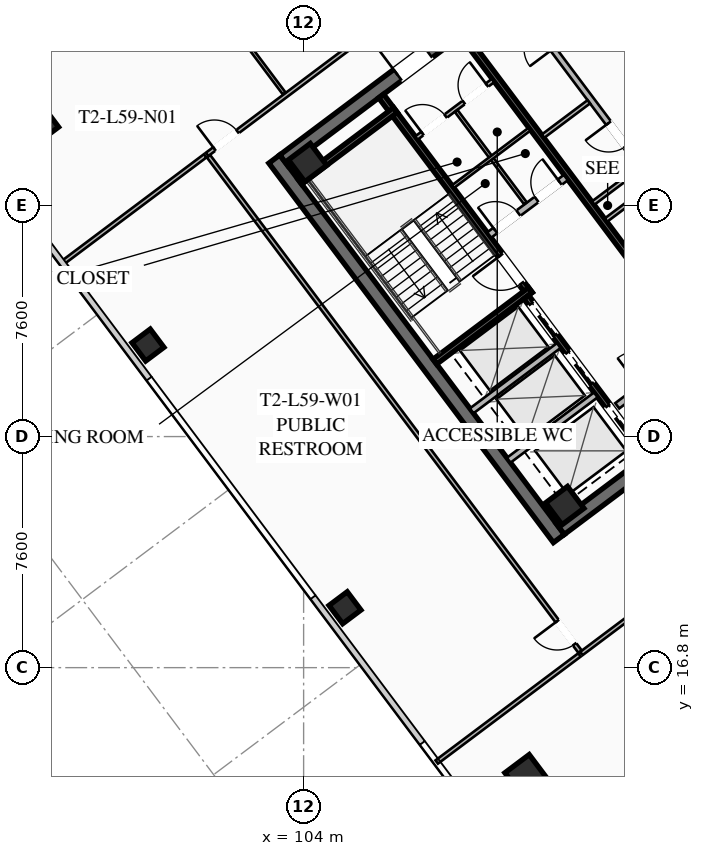
"""IFC4 building model, lengths in metres.
Left out: names, types, materials, properties, quantities, classifications, styles, units other than length and angle.
Written with IfcOpenShell. Run it as: python <this file> out.ifc"""

import sys

from ifc_helpers import new_model, si_unit, direction, frame, frame_2d, origin, origin_2d, place, context, subcontext, project, spatial, rectangle, hollow_rectangle, extrude, element, fill, save


model = new_model("IFC4")
c1 = context("Model", 3, precision=1e-05, world=origin(), true_north=direction((0.0, 1.0)))
c2 = subcontext(c1, "Body", "Model", "MODEL_VIEW")
j1 = project(units=[si_unit("LENGTHUNIT", "METRE"), si_unit("PLANEANGLEUNIT", "RADIAN")], contexts=[c1])
p1 = place(None, origin())
s1 = spatial("IfcSite", under=j1, at=p1, CompositionType="ELEMENT")
p2 = place(p1, origin())
s2 = spatial("IfcBuilding", under=s1, at=p2, CompositionType="ELEMENT")
p3 = place(p2, frame((0.0, 0.0, 218.4)))
s3 = spatial("IfcBuildingStorey", under=s2, at=p3, CompositionType="ELEMENT", Elevation=218.4)
p4 = place(p3, frame((112.396, 21.047, 0.0), z_axis=(0.0, 0.0, 1.0), x_axis=(-0.600005007985, 0.799996243986, 0.0)))
e1 = element("IfcWall", 1, at=p4, inside=s3, PredefinedType="SHEAR", context=c2, shape_type="SweptSolid", body=[
    extrude(rectangle(XDim=15.6, YDim=0.45, at=frame_2d((7.8, 0.0))), origin(), (0.0, 0.0, 1.0), 3.55),
])
p5 = place(p3, frame((124.649, 30.518, 0.0), z_axis=(0.0, 0.0, 1.0), x_axis=(-0.8, -0.6, 0.0)))
e2 = element("IfcWall", 2, at=p5, inside=s3, PredefinedType="SHEAR", context=c2, shape_type="SweptSolid", body=[
    extrude(rectangle(XDim=15.26, YDim=0.45, at=frame_2d((7.63, 0.0))), origin(), (0.0, 0.0, 1.0), 3.55),
])
p6 = place(p5, frame((9.33, 0.0, 0.0)))
e3 = element("IfcOpeningElement", 3, at=p6, cuts=e2, PredefinedType="OPENING", context=c2, shape_type="SweptSolid", body=[
    extrude(rectangle(XDim=1.25, YDim=2.25, at=frame_2d((0.625, 1.125))), frame((0.0, 0.235, 0.0), z_axis=(0.0, -1.0, 0.0), x_axis=(1.0, 0.0, 0.0)), (0.0, 0.0, 1.0), 0.47),
])
p7 = place(p5, frame((4.28, 0.0, 0.0)))
e4 = element("IfcOpeningElement", 4, at=p7, cuts=e2, PredefinedType="OPENING", context=c2, shape_type="SweptSolid", body=[
    extrude(rectangle(XDim=1.25, YDim=2.25, at=frame_2d((0.625, 1.125))), frame((0.0, 0.235, 0.0), z_axis=(0.0, -1.0, 0.0), x_axis=(1.0, 0.0, 0.0)), (0.0, 0.0, 1.0), 0.47),
])
p8 = place(p3, frame((103.351, 33.482, 0.0), z_axis=(0.0, 0.0, 1.0), x_axis=(0.8, 0.6, 0.0)))
e5 = element("IfcWall", 5, at=p8, inside=s3, PredefinedType="SHEAR", context=c2, shape_type="SweptSolid", body=[
    extrude(rectangle(XDim=15.26, YDim=0.45, at=frame_2d((7.63, 0.0))), origin(), (0.0, 0.0, 1.0), 3.55),
])
p9 = place(p8, frame((4.68, 0.0, 0.0)))
e6 = element("IfcOpeningElement", 6, at=p9, cuts=e5, PredefinedType="OPENING", context=c2, shape_type="SweptSolid", body=[
    extrude(rectangle(XDim=1.25, YDim=2.25, at=frame_2d((0.625, 1.125))), frame((0.0, 0.235, 0.0), z_axis=(0.0, -1.0, 0.0), x_axis=(1.0, 0.0, 0.0)), (0.0, 0.0, 1.0), 0.47),
])
p10 = place(p8, frame((9.73, 0.0, 0.0)))
e7 = element("IfcOpeningElement", 7, at=p10, cuts=e5, PredefinedType="OPENING", context=c2, shape_type="SweptSolid", body=[
    extrude(rectangle(XDim=1.25, YDim=2.25, at=frame_2d((0.625, 1.125))), frame((0.0, 0.235, 0.0), z_axis=(0.0, -1.0, 0.0), x_axis=(1.0, 0.0, 0.0)), (0.0, 0.0, 1.0), 0.47),
])
for number, where, z_axis, x_axis in (
    (8, (112.59, 22.13, 0.0), (0.0, 0.0, 1.0), (0.8, 0.6, 0.0)),
    (9, (104.13, 33.41, 0.0), (0.0, 0.0, 1.0), (0.8, 0.6, 0.0)),
):
    element("IfcColumn", number, at=place(p3, frame(where, z_axis=z_axis, x_axis=x_axis)), inside=s3, PredefinedType="COLUMN", context=c2, shape_type="SweptSolid", body=[
        extrude(hollow_rectangle(XDim=0.9, YDim=0.9, WallThickness=0.04, at=origin_2d()), origin(), (0.0, 0.0, 1.0), 3.37),
    ])
for number, where, z_axis, x_axis in (
    (10, (111.32, 13.24, 0.0), (0.0, 0.0, 1.0), (0.8, 0.6, 0.0)),
    (11, (95.24, 34.68, 0.0), (0.0, 0.0, 1.0), (0.8, 0.6, 0.0)),
):
    element("IfcColumn", number, at=place(p3, frame(where, z_axis=z_axis, x_axis=x_axis)), inside=s3, PredefinedType="COLUMN", context=c2, shape_type="SweptSolid", body=[
        extrude(hollow_rectangle(XDim=1.0, YDim=1.0, WallThickness=0.04, at=origin_2d()), origin(), (0.0, 0.0, 1.0), 3.37),
    ])
for number, where, z_axis, x_axis in (
    (12, (98.88, 27.41, 0.0), (0.0, 0.0, 1.0), (0.8, 0.6, 0.0)),
    (13, (105.36, 18.77, 0.0), (0.0, 0.0, 1.0), (0.8, 0.6, 0.0)),
):
    element("IfcColumn", number, at=place(p3, frame(where, z_axis=z_axis, x_axis=x_axis)), inside=s3, PredefinedType="COLUMN", context=c2, shape_type="SweptSolid", body=[
        extrude(hollow_rectangle(XDim=0.75, YDim=0.75, WallThickness=0.032, at=origin_2d()), origin(), (0.0, 0.0, 1.0), 3.37),
    ])
p11 = place(p3, frame((111.44, 29.08, 0.0), z_axis=(0.0, 0.0, 1.0), x_axis=(-0.59999041401, 0.800007189403, 0.0)))
e14 = element("IfcWall", 14, at=p11, inside=s3, PredefinedType="SHEAR", context=c2, shape_type="SweptSolid", body=[
    extrude(rectangle(XDim=8.15, YDim=0.2, at=frame_2d((4.075, 0.0))), origin(), (0.0, 0.0, 1.0), 3.37),
])
p12 = place(p11, frame((0.45, 0.0, 0.0)))
e15 = element("IfcOpeningElement", 15, at=p12, cuts=e14, PredefinedType="OPENING", context=c2, shape_type="SweptSolid", body=[
    extrude(rectangle(XDim=1.15, YDim=2.2, at=frame_2d((0.575, 1.1))), frame((0.0, 0.11, 0.0), z_axis=(0.0, -1.0, 0.0), x_axis=(1.0, 0.0, 0.0)), (0.0, 0.0, 1.0), 0.22),
])
for number, where, z_axis, x_axis in (
    (16, (108.316, 26.862, 0.0), (0.0, 0.0, 1.0), (0.8, 0.6, 0.0)),
    (17, (103.876, 32.782, 0.0), (0.0, 0.0, 1.0), (0.8, 0.6, 0.0)),
):
    element("IfcWall", number, at=place(p3, frame(where, z_axis=z_axis, x_axis=x_axis)), inside=s3, PredefinedType="SHEAR", context=c2, shape_type="SweptSolid", body=[
        extrude(rectangle(XDim=3.93, YDim=0.2, at=frame_2d((1.965, 0.0))), origin(), (0.0, 0.0, 1.0), 3.37),
    ])
p13 = place(p3, frame((118.058, 25.856, 0.0), z_axis=(0.0, 0.0, 1.0), x_axis=(-0.600002657301, 0.799998007018, 0.0)))
e18 = element("IfcWall", 18, at=p13, inside=s3, PredefinedType="SHEAR", context=c2, shape_type="SweptSolid", body=[
    extrude(rectangle(XDim=14.7, YDim=0.2, at=frame_2d((7.35, 0.0))), origin(), (0.0, 0.0, 1.0), 3.37),
])
p14 = place(p3, frame((110.104, 31.028, 0.0), z_axis=(0.0, 0.0, 1.0), x_axis=(0.800018601094, 0.59997519774, 0.0)))
e19 = element("IfcWall", 19, at=p14, inside=s3, PredefinedType="SOLIDWALL", context=c2, shape_type="SweptSolid", body=[
    extrude(rectangle(XDim=3.15, YDim=0.22, at=frame_2d((1.575, 0.0))), origin(), (0.0, 0.0, 1.0), 2.723),
])
p15 = place(p14, frame((0.25, 0.0, 0.0)))
e20 = element("IfcOpeningElement", 20, at=p15, cuts=e19, PredefinedType="OPENING", context=c2, shape_type="SweptSolid", body=[
    extrude(rectangle(XDim=0.95, YDim=2.05, at=frame_2d((0.475, 1.025))), frame((0.0, 0.12, 0.0), z_axis=(0.0, -1.0, 0.0), x_axis=(1.0, 0.0, 0.0)), (0.0, 0.0, 1.0), 0.24),
])
p16 = place(p14, frame((1.95, 0.0, 0.0)))
e21 = element("IfcOpeningElement", 21, at=p16, cuts=e19, PredefinedType="OPENING", context=c2, shape_type="SweptSolid", body=[
    extrude(rectangle(XDim=0.95, YDim=2.05, at=frame_2d((0.475, 1.025))), frame((0.0, 0.12, 0.0), z_axis=(0.0, -1.0, 0.0), x_axis=(1.0, 0.0, 0.0)), (0.0, 0.0, 1.0), 0.24),
])
p17 = place(p3, frame((114.316, 25.412, 0.0), z_axis=(0.0, 0.0, 1.0), x_axis=(0.800018601094, 0.59997519774, 0.0)))
e22 = element("IfcWall", 22, at=p17, inside=s3, PredefinedType="SOLIDWALL", context=c2, shape_type="SweptSolid", body=[
    extrude(rectangle(XDim=3.15, YDim=0.22, at=frame_2d((1.575, 0.0))), origin(), (0.0, 0.0, 1.0), 2.723),
])
p18 = place(p17, frame((0.95, 0.0, 0.0)))
e23 = element("IfcOpeningElement", 23, at=p18, cuts=e22, PredefinedType="OPENING", context=c2, shape_type="SweptSolid", body=[
    extrude(rectangle(XDim=1.25, YDim=2.25, at=frame_2d((0.625, 1.125))), frame((0.0, 0.12, 0.0), z_axis=(0.0, -1.0, 0.0), x_axis=(1.0, 0.0, 0.0)), (0.0, 0.0, 1.0), 0.24),
])
p19 = place(p3, frame((115.25, 23.75, 0.0), z_axis=(0.0, 0.0, 1.0), x_axis=(-0.599994036198, 0.800004472816, 0.0)))
e24 = element("IfcWall", 24, at=p19, inside=s3, PredefinedType="SHEAR", context=c2, shape_type="SweptSolid", body=[
    extrude(rectangle(XDim=6.55, YDim=0.2, at=frame_2d((3.275, 0.0))), origin(), (0.0, 0.0, 1.0), 3.37),
])
p20 = place(p19, frame((4.975, 0.0, 0.0)))
e25 = element("IfcOpeningElement", 25, at=p20, cuts=e24, PredefinedType="OPENING", context=c2, shape_type="SweptSolid", body=[
    extrude(rectangle(XDim=1.3, YDim=2.25, at=frame_2d((0.65, 1.125))), frame((0.0, 0.11, 0.0), z_axis=(0.0, -1.0, 0.0), x_axis=(1.0, 0.0, 0.0)), (0.0, 0.0, 1.0), 0.22),
])
p21 = place(p19, frame((2.975, 0.0, 0.0)))
e26 = element("IfcOpeningElement", 26, at=p21, cuts=e24, PredefinedType="OPENING", context=c2, shape_type="SweptSolid", body=[
    extrude(rectangle(XDim=1.3, YDim=2.25, at=frame_2d((0.65, 1.125))), frame((0.0, 0.11, 0.0), z_axis=(0.0, -1.0, 0.0), x_axis=(1.0, 0.0, 0.0)), (0.0, 0.0, 1.0), 0.22),
])
p22 = place(p19, frame((0.775, 0.0, 0.0)))
e27 = element("IfcOpeningElement", 27, at=p22, cuts=e24, PredefinedType="OPENING", context=c2, shape_type="SweptSolid", body=[
    extrude(rectangle(XDim=1.3, YDim=2.25, at=frame_2d((0.65, 1.125))), frame((0.0, 0.11, 0.0), z_axis=(0.0, -1.0, 0.0), x_axis=(1.0, 0.0, 0.0)), (0.0, 0.0, 1.0), 0.22),
])
for number, where, z_axis, x_axis in (
    (28, (110.746, 23.622, 0.0), (0.0, 0.0, 1.0), (0.8, 0.6, 0.0)),
    (29, (109.528, 25.246, 0.0), (0.0, 0.0, 1.0), (0.8, 0.6, 0.0)),
):
    element("IfcWall", number, at=place(p3, frame(where, z_axis=z_axis, x_axis=x_axis)), inside=s3, PredefinedType="SOLIDWALL", context=c2, shape_type="SweptSolid", body=[
        extrude(rectangle(XDim=3.58, YDim=0.2, at=frame_2d((1.79, 0.0))), origin(), (0.0, 0.0, 1.0), 3.37),
    ])
p23 = place(p3, frame((112.75, 40.25, 0.0), z_axis=(0.0, 0.0, 1.0), x_axis=(0.599994036198, -0.800004472816, 0.0)))
e30 = element("IfcWall", 30, at=p23, inside=s3, PredefinedType="SHEAR", context=c2, shape_type="SweptSolid", body=[
    extrude(rectangle(XDim=6.55, YDim=0.2, at=frame_2d((3.275, 0.0))), origin(), (0.0, 0.0, 1.0), 3.37),
])
p24 = place(p23, frame((5.075, 0.0, 0.0)))
e31 = element("IfcOpeningElement", 31, at=p24, cuts=e30, PredefinedType="OPENING", context=c2, shape_type="SweptSolid", body=[
    extrude(rectangle(XDim=1.1, YDim=2.2, at=frame_2d((0.55, 1.1))), frame((0.0, 0.11, 0.0), z_axis=(0.0, -1.0, 0.0), x_axis=(1.0, 0.0, 0.0)), (0.0, 0.0, 1.0), 0.22),
])
p25 = place(p23, frame((3.025, 0.0, 0.0)))
e32 = element("IfcOpeningElement", 32, at=p25, cuts=e30, PredefinedType="OPENING", context=c2, shape_type="SweptSolid", body=[
    extrude(rectangle(XDim=1.1, YDim=2.2, at=frame_2d((0.55, 1.1))), frame((0.0, 0.11, 0.0), z_axis=(0.0, -1.0, 0.0), x_axis=(1.0, 0.0, 0.0)), (0.0, 0.0, 1.0), 0.22),
])
p26 = place(p23, frame((1.025, 0.0, 0.0)))
e33 = element("IfcOpeningElement", 33, at=p26, cuts=e30, PredefinedType="OPENING", context=c2, shape_type="SweptSolid", body=[
    extrude(rectangle(XDim=1.1, YDim=2.2, at=frame_2d((0.55, 1.1))), frame((0.0, 0.11, 0.0), z_axis=(0.0, -1.0, 0.0), x_axis=(1.0, 0.0, 0.0)), (0.0, 0.0, 1.0), 0.22),
])
p27 = place(p3, frame((107.71, 34.22, 0.0), z_axis=(0.0, 0.0, 1.0), x_axis=(0.799981399002, 0.60002480053, 0.0)))
e34 = element("IfcWall", 34, at=p27, inside=s3, PredefinedType="PARTITIONING", context=c2, shape_type="SweptSolid", body=[
    extrude(rectangle(XDim=3.15, YDim=0.135, at=frame_2d((1.575, 0.0))), origin(), (0.0, 0.0, 1.0), 2.723),
])
p28 = place(p27, frame((0.25, 0.0, 0.0)))
e35 = element("IfcOpeningElement", 35, at=p28, cuts=e34, PredefinedType="OPENING", context=c2, shape_type="SweptSolid", body=[
    extrude(rectangle(XDim=0.95, YDim=2.05, at=frame_2d((0.475, 1.025))), frame((0.0, 0.077, 0.0), z_axis=(0.0, -1.0, 0.0), x_axis=(1.0, 0.0, 0.0)), (0.0, 0.0, 1.0), 0.155),
])
p29 = place(p27, frame((1.95, 0.0, 0.0)))
e36 = element("IfcOpeningElement", 36, at=p29, cuts=e34, PredefinedType="OPENING", context=c2, shape_type="SweptSolid", body=[
    extrude(rectangle(XDim=0.95, YDim=2.05, at=frame_2d((0.475, 1.025))), frame((0.0, 0.077, 0.0), z_axis=(0.0, -1.0, 0.0), x_axis=(1.0, 0.0, 0.0)), (0.0, 0.0, 1.0), 0.155),
])
p30 = place(p3, frame((111.296, 32.072, 0.0), z_axis=(0.0, 0.0, 1.0), x_axis=(-0.59995887973, 0.800030838552, 0.0)))
e37 = element("IfcWall", 37, at=p30, inside=s3, PredefinedType="PARTITIONING", context=c2, shape_type="SweptSolid", body=[
    extrude(rectangle(XDim=3.8, YDim=0.11, at=frame_2d((1.9, 0.0))), origin(), (0.0, 0.0, 1.0), 2.723),
])
p31 = place(p3, frame((108.91, 32.62, 0.0), z_axis=(0.0, 0.0, 1.0), x_axis=(0.800018601094, 0.59997519774, 0.0)))
e38 = element("IfcWall", 38, at=p31, inside=s3, PredefinedType="PARTITIONING", context=c2, shape_type="SweptSolid", body=[
    extrude(rectangle(XDim=3.15, YDim=0.11, at=frame_2d((1.575, 0.0))), origin(), (0.0, 0.0, 1.0), 2.723),
])
p32 = place(p3, frame((113.946, 31.522, 0.0), z_axis=(0.0, 0.0, 1.0), x_axis=(0.8, 0.6, 0.0)))
e39 = element("IfcWall", 39, at=p32, inside=s3, PredefinedType="PARTITIONING", context=c2, shape_type="SweptSolid", body=[
    extrude(rectangle(XDim=1.88, YDim=0.135, at=frame_2d((0.94, 0.0))), origin(), (0.0, 0.0, 1.0), 2.723),
])
p33 = place(p3, frame((115.11, 33.27, 0.0), z_axis=(0.0, 0.0, 1.0), x_axis=(-0.600011160345, 0.79999162962, 0.0)))
e40 = element("IfcWall", 40, at=p33, inside=s3, PredefinedType="SOLIDWALL", context=c2, shape_type="SweptSolid", body=[
    extrude(rectangle(XDim=7.0, YDim=0.2, at=frame_2d((3.5, 0.0))), origin(), (0.0, 0.0, 1.0), 2.723),
])
p34 = place(p33, frame((0.85, 0.0, 0.0)))
e41 = element("IfcOpeningElement", 41, at=p34, cuts=e40, PredefinedType="OPENING", context=c2, shape_type="SweptSolid", body=[
    extrude(rectangle(XDim=0.95, YDim=2.05, at=frame_2d((0.475, 1.025))), frame((0.0, 0.11, 0.0), z_axis=(0.0, -1.0, 0.0), x_axis=(1.0, 0.0, 0.0)), (0.0, 0.0, 1.0), 0.22),
])
p35 = place(p33, frame((4.85, 0.0, 0.0)))
e42 = element("IfcOpeningElement", 42, at=p35, cuts=e40, PredefinedType="OPENING", context=c2, shape_type="SweptSolid", body=[
    extrude(rectangle(XDim=0.95, YDim=2.05, at=frame_2d((0.475, 1.025))), frame((0.0, 0.11, 0.0), z_axis=(0.0, -1.0, 0.0), x_axis=(1.0, 0.0, 0.0)), (0.0, 0.0, 1.0), 0.22),
])
p36 = place(p3, frame((113.526, 32.082, 0.0), z_axis=(0.0, 0.0, 1.0), x_axis=(0.800046745961, 0.599937666993, 0.0)))
e43 = element("IfcWall", 43, at=p36, inside=s3, PredefinedType="PARTITIONING", context=c2, shape_type="SweptSolid", body=[
    extrude(rectangle(XDim=1.88, YDim=0.135, at=frame_2d((0.94, 0.0))), origin(), (0.0, 0.0, 1.0), 2.723),
])
p37 = place(p3, frame((111.876, 34.282, 0.0), z_axis=(0.0, 0.0, 1.0), x_axis=(0.8, 0.6, 0.0)))
e44 = element("IfcWall", 44, at=p37, inside=s3, PredefinedType="PARTITIONING", context=c2, shape_type="SweptSolid", body=[
    extrude(rectangle(XDim=1.88, YDim=0.135, at=frame_2d((0.94, 0.0))), origin(), (0.0, 0.0, 1.0), 2.723),
])
p38 = place(p3, frame((100.826, 33.682, 0.0), z_axis=(0.0, 0.0, 1.0), x_axis=(0.79999742786, 0.600003429504, 0.0)))
e45 = element("IfcWall", 45, at=p38, inside=s3, PredefinedType="PARTITIONING", context=c2, shape_type="SweptSolid", body=[
    extrude(rectangle(XDim=22.78, YDim=0.135, at=frame_2d((11.39, 0.0))), origin(), (0.0, 0.0, 1.0), 2.723),
])
p39 = place(p38, frame((0.3, 0.0, 0.0)))
e46 = element("IfcOpeningElement", 46, at=p39, cuts=e45, PredefinedType="OPENING", context=c2, shape_type="SweptSolid", body=[
    extrude(rectangle(XDim=0.95, YDim=2.05, at=frame_2d((0.475, 1.025))), frame((0.0, 0.077, 0.0), z_axis=(0.0, -1.0, 0.0), x_axis=(1.0, 0.0, 0.0)), (0.0, 0.0, 1.0), 0.155),
])
p40 = place(p38, frame((9.143, 0.0, 0.0)))
e47 = element("IfcOpeningElement", 47, at=p40, cuts=e45, PredefinedType="OPENING", context=c2, shape_type="SweptSolid", body=[
    extrude(rectangle(XDim=0.95, YDim=2.05, at=frame_2d((0.475, 1.025))), frame((0.0, 0.077, 0.0), z_axis=(0.0, -1.0, 0.0), x_axis=(1.0, 0.0, 0.0)), (0.0, 0.0, 1.0), 0.155),
])
p41 = place(p38, frame((21.53, 0.0, 0.0)))
e48 = element("IfcOpeningElement", 48, at=p41, cuts=e45, PredefinedType="OPENING", context=c2, shape_type="SweptSolid", body=[
    extrude(rectangle(XDim=0.95, YDim=2.05, at=frame_2d((0.475, 1.025))), frame((0.0, 0.077, 0.0), z_axis=(0.0, -1.0, 0.0), x_axis=(1.0, 0.0, 0.0)), (0.0, 0.0, 1.0), 0.155),
])
p42 = place(p3, frame((103.362, 35.684, 0.0), z_axis=(0.0, 0.0, 1.0), x_axis=(-0.6, 0.8, 0.0)))
e49 = element("IfcWall", 49, at=p42, inside=s3, PredefinedType="PARTITIONING", context=c2, shape_type="SweptSolid", body=[
    extrude(rectangle(XDim=6.15, YDim=0.11, at=frame_2d((3.075, 0.0))), origin(), (0.0, 0.0, 1.0), 2.723),
])
p43 = place(p3, frame((124.282, 25.624, 0.0), z_axis=(0.0, 0.0, 1.0), x_axis=(-0.800004206286, -0.599994391578, 0.0)))
e50 = element("IfcWall", 50, at=p43, inside=s3, PredefinedType="PARTITIONING", context=c2, shape_type="SweptSolid", body=[
    extrude(rectangle(XDim=13.93, YDim=0.135, at=frame_2d((6.965, 0.0))), origin(), (0.0, 0.0, 1.0), 2.723),
])
p44 = place(p43, frame((3.69, 0.0, 0.0)))
e51 = element("IfcOpeningElement", 51, at=p44, cuts=e50, PredefinedType="OPENING", context=c2, shape_type="SweptSolid", body=[
    extrude(rectangle(XDim=0.95, YDim=2.05, at=frame_2d((0.475, 1.025))), frame((0.0, 0.077, 0.0), z_axis=(0.0, -1.0, 0.0), x_axis=(1.0, 0.0, 0.0)), (0.0, 0.0, 1.0), 0.155),
])
p45 = place(p3, frame((113.09, 17.33, 0.0), z_axis=(0.0, 0.0, 1.0), x_axis=(-0.60000575578, 0.799995683132, 0.0)))
e52 = element("IfcWall", 52, at=p45, inside=s3, PredefinedType="PARTITIONING", context=c2, shape_type="SweptSolid", body=[
    extrude(rectangle(XDim=20.36, YDim=0.135, at=frame_2d((10.18, 0.0))), origin(), (0.0, 0.0, 1.0), 2.723),
])
p46 = place(p45, frame((0.3, 0.0, 0.0)))
e53 = element("IfcOpeningElement", 53, at=p46, cuts=e52, PredefinedType="OPENING", context=c2, shape_type="SweptSolid", body=[
    extrude(rectangle(XDim=0.95, YDim=2.05, at=frame_2d((0.475, 1.025))), frame((0.0, 0.077, 0.0), z_axis=(0.0, -1.0, 0.0), x_axis=(1.0, 0.0, 0.0)), (0.0, 0.0, 1.0), 0.155),
])
for number, where, z_axis, x_axis in (
    (54, (100.762, 33.634, 0.0), (0.0, 0.0, 1.0), (-0.8, -0.6, 0.0)),
    (55, (108.378, 13.696, 0.0), (0.0, 0.0, 1.0), (0.8, 0.6, 0.0)),
):
    element("IfcWall", number, at=place(p3, frame(where, z_axis=z_axis, x_axis=x_axis)), inside=s3, PredefinedType="PARTITIONING", context=c2, shape_type="SweptSolid", body=[
        extrude(rectangle(XDim=5.87, YDim=0.135, at=frame_2d((2.935, 0.0))), origin(), (0.0, 0.0, 1.0), 2.723),
    ])
p47 = place(p9, origin())
e56 = element("IfcDoor", 56, at=p47, inside=s3, OperationType="SINGLE_SWING_LEFT", PredefinedType="DOOR", context=c2, shape_type="SweptSolid", body=[
    extrude(rectangle(XDim=1.25, YDim=2.25, at=frame_2d((0.625, 1.125))), frame((0.0, 0.025, 0.0), z_axis=(0.0, -1.0, 0.0), x_axis=(1.0, 0.0, 0.0)), (0.0, 0.0, 1.0), 0.05),
])
fill(e6, e56)
p48 = place(p12, origin())
e57 = element("IfcDoor", 57, at=p48, inside=s3, OperationType="SINGLE_SWING_RIGHT", PredefinedType="DOOR", context=c2, shape_type="SweptSolid", body=[
    extrude(rectangle(XDim=1.15, YDim=2.2, at=frame_2d((0.575, 1.1))), frame((0.0, 0.025, 0.0), z_axis=(0.0, -1.0, 0.0), x_axis=(1.0, 0.0, 0.0)), (0.0, 0.0, 1.0), 0.05),
])
fill(e15, e57)
p49 = place(p28, origin())
e58 = element("IfcDoor", 58, at=p49, inside=s3, OperationType="SINGLE_SWING_LEFT", PredefinedType="DOOR", context=c2, shape_type="SweptSolid", body=[
    extrude(rectangle(XDim=0.95, YDim=2.05, at=frame_2d((0.475, 1.025))), frame((0.0, 0.025, 0.0), z_axis=(0.0, -1.0, 0.0), x_axis=(1.0, 0.0, 0.0)), (0.0, 0.0, 1.0), 0.05),
])
fill(e35, e58)
p50 = place(p29, origin())
e59 = element("IfcDoor", 59, at=p50, inside=s3, OperationType="SINGLE_SWING_RIGHT", PredefinedType="DOOR", context=c2, shape_type="SweptSolid", body=[
    extrude(rectangle(XDim=0.95, YDim=2.05, at=frame_2d((0.475, 1.025))), frame((0.0, 0.025, 0.0), z_axis=(0.0, -1.0, 0.0), x_axis=(1.0, 0.0, 0.0)), (0.0, 0.0, 1.0), 0.05),
])
fill(e36, e59)
p51 = place(p15, origin())
e60 = element("IfcDoor", 60, at=p51, inside=s3, OperationType="SINGLE_SWING_LEFT", PredefinedType="DOOR", context=c2, shape_type="SweptSolid", body=[
    extrude(rectangle(XDim=0.95, YDim=2.05, at=frame_2d((0.475, 1.025))), frame((0.0, 0.025, 0.0), z_axis=(0.0, -1.0, 0.0), x_axis=(1.0, 0.0, 0.0)), (0.0, 0.0, 1.0), 0.05),
])
fill(e20, e60)
p52 = place(p16, origin())
e61 = element("IfcDoor", 61, at=p52, inside=s3, OperationType="SINGLE_SWING_RIGHT", PredefinedType="DOOR", context=c2, shape_type="SweptSolid", body=[
    extrude(rectangle(XDim=0.95, YDim=2.05, at=frame_2d((0.475, 1.025))), frame((0.0, 0.025, 0.0), z_axis=(0.0, -1.0, 0.0), x_axis=(1.0, 0.0, 0.0)), (0.0, 0.0, 1.0), 0.05),
])
fill(e21, e61)
p53 = place(p34, origin())
e62 = element("IfcDoor", 62, at=p53, inside=s3, OperationType="SINGLE_SWING_RIGHT", PredefinedType="DOOR", context=c2, shape_type="SweptSolid", body=[
    extrude(rectangle(XDim=0.95, YDim=2.05, at=frame_2d((0.475, 1.025))), frame((0.0, 0.025, 0.0), z_axis=(0.0, -1.0, 0.0), x_axis=(1.0, 0.0, 0.0)), (0.0, 0.0, 1.0), 0.05),
])
fill(e41, e62)
p54 = place(p39, origin())
e63 = element("IfcDoor", 63, at=p54, inside=s3, OperationType="SINGLE_SWING_LEFT", PredefinedType="DOOR", context=c2, shape_type="SweptSolid", body=[
    extrude(rectangle(XDim=0.95, YDim=2.05, at=frame_2d((0.475, 1.025))), frame((0.0, 0.025, 0.0), z_axis=(0.0, -1.0, 0.0), x_axis=(1.0, 0.0, 0.0)), (0.0, 0.0, 1.0), 0.05),
])
fill(e46, e63)
p55 = place(p46, origin())
e64 = element("IfcDoor", 64, at=p55, inside=s3, OperationType="SINGLE_SWING_RIGHT", PredefinedType="DOOR", context=c2, shape_type="SweptSolid", body=[
    extrude(rectangle(XDim=0.95, YDim=2.05, at=frame_2d((0.475, 1.025))), frame((0.0, 0.025, 0.0), z_axis=(0.0, -1.0, 0.0), x_axis=(1.0, 0.0, 0.0)), (0.0, 0.0, 1.0), 0.05),
])
fill(e53, e64)
p56 = place(p20, origin())
e65 = element("IfcDoor", 65, at=p56, inside=s3, OperationType="SLIDING_TO_LEFT", PredefinedType="DOOR", context=c2, shape_type="SweptSolid", body=[
    extrude(rectangle(XDim=1.3, YDim=2.25, at=frame_2d((0.65, 1.125))), frame((0.0, 0.025, 0.0), z_axis=(0.0, -1.0, 0.0), x_axis=(1.0, 0.0, 0.0)), (0.0, 0.0, 1.0), 0.05),
])
fill(e25, e65)
p57 = place(p21, origin())
e66 = element("IfcDoor", 66, at=p57, inside=s3, OperationType="SLIDING_TO_LEFT", PredefinedType="DOOR", context=c2, shape_type="SweptSolid", body=[
    extrude(rectangle(XDim=1.3, YDim=2.25, at=frame_2d((0.65, 1.125))), frame((0.0, 0.025, 0.0), z_axis=(0.0, -1.0, 0.0), x_axis=(1.0, 0.0, 0.0)), (0.0, 0.0, 1.0), 0.05),
])
fill(e26, e66)
p58 = place(p22, origin())
e67 = element("IfcDoor", 67, at=p58, inside=s3, OperationType="SLIDING_TO_LEFT", PredefinedType="DOOR", context=c2, shape_type="SweptSolid", body=[
    extrude(rectangle(XDim=1.3, YDim=2.25, at=frame_2d((0.65, 1.125))), frame((0.0, 0.025, 0.0), z_axis=(0.0, -1.0, 0.0), x_axis=(1.0, 0.0, 0.0)), (0.0, 0.0, 1.0), 0.05),
])
fill(e27, e67)
p59 = place(p25, origin())
e68 = element("IfcDoor", 68, at=p59, inside=s3, OperationType="SLIDING_TO_LEFT", PredefinedType="DOOR", context=c2, shape_type="SweptSolid", body=[
    extrude(rectangle(XDim=1.1, YDim=2.2, at=frame_2d((0.55, 1.1))), frame((0.0, 0.025, 0.0), z_axis=(0.0, -1.0, 0.0), x_axis=(1.0, 0.0, 0.0)), (0.0, 0.0, 1.0), 0.05),
])
fill(e32, e68)
save(model, sys.argv[1])
